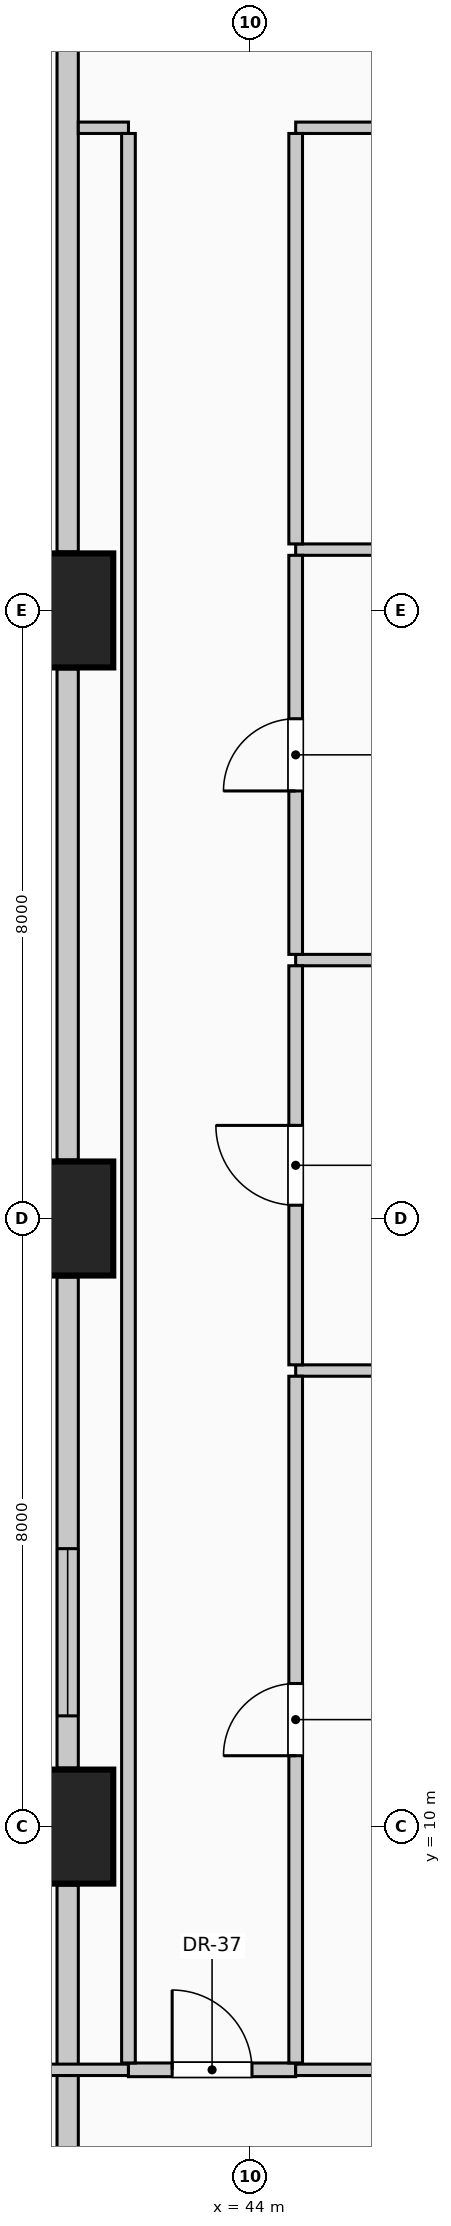
"""IFC4 building model, lengths in metres.
Left out: names, types, materials, properties, quantities, classifications, styles, units other than length and angle.
Written with IfcOpenShell. Run it as: python <this file> out.ifc"""

import sys

from ifc_helpers import new_model, si_unit, direction, frame, frame_2d, origin, origin_2d, place, context, subcontext, project, spatial, rectangle, extrude, element, fill, save


model = new_model("IFC4")
c1 = context("Model", 3, precision=1e-05, world=origin(), true_north=direction((0.0, 1.0)))
c2 = subcontext(c1, "Body", "Model", "MODEL_VIEW")
j1 = project(units=[si_unit("LENGTHUNIT", "METRE"), si_unit("PLANEANGLEUNIT", "RADIAN")], contexts=[c1])
p1 = place(None, origin())
s1 = spatial("IfcSite", under=j1, at=p1, CompositionType="ELEMENT")
p2 = place(p1, origin())
s2 = spatial("IfcBuilding", under=s1, at=p2, CompositionType="ELEMENT")
p3 = place(p2, frame((0.0, 0.0, 26.6)))
s3 = spatial("IfcBuildingStorey", under=s2, at=p3, CompositionType="ELEMENT", Elevation=26.6)
for number, where, z_axis, x_axis in (
    (1, (41.6, 10.0, 0.0), (0.0, 0.0, 1.0), (1.0, 0.0, 0.0)),
    (2, (41.6, 18.0, 0.0), (0.0, 0.0, 1.0), (1.0, 0.0, 0.0)),
    (3, (41.6, 26.0, 0.0), (0.0, 0.0, 1.0), (1.0, 0.0, 0.0)),
):
    element("IfcColumn", number, at=place(p3, frame(where, z_axis=z_axis, x_axis=x_axis)), inside=s3, PredefinedType="COLUMN", context=c2, shape_type="SweptSolid", body=[
        extrude(rectangle(XDim=1.2, YDim=1.5, at=origin_2d()), origin(), (0.0, 0.0, 1.0), 4.0),
    ])
p4 = place(p3, frame((41.6, 1.37, 0.0), z_axis=(0.0, 0.0, 1.0), x_axis=(0.0, 1.0, 0.0)))
e4 = element("IfcWall", 4, at=p4, inside=s3, PredefinedType="SOLIDWALL", context=c2, shape_type="SweptSolid", body=[
    extrude(rectangle(XDim=7.86, YDim=0.28, at=frame_2d((3.93, 0.0))), origin(), (0.0, 0.0, 1.0), 3.0),
])
p5 = place(p4, frame((1.153, 0.0, 0.42)))
e5 = element("IfcOpeningElement", 5, at=p5, cuts=e4, PredefinedType="OPENING", context=c2, shape_type="SweptSolid", body=[
    extrude(rectangle(XDim=2.2, YDim=1.95, at=frame_2d((1.1, 0.975))), frame((0.0, 0.15, 0.0), z_axis=(0.0, -1.0, 0.0), x_axis=(1.0, 0.0, 0.0)), (0.0, 0.0, 1.0), 0.3),
])
p6 = place(p3, frame((41.6, 10.77, 0.0), z_axis=(0.0, 0.0, 1.0), x_axis=(0.0, 1.0, 0.0)))
e6 = element("IfcWall", 6, at=p6, inside=s3, PredefinedType="SOLIDWALL", context=c2, shape_type="SweptSolid", body=[
    extrude(rectangle(XDim=6.46, YDim=0.28, at=frame_2d((3.23, 0.0))), origin(), (0.0, 0.0, 1.0), 3.0),
])
p7 = place(p6, frame((0.687, 0.0, 0.42)))
e7 = element("IfcOpeningElement", 7, at=p7, cuts=e6, PredefinedType="OPENING", context=c2, shape_type="SweptSolid", body=[
    extrude(rectangle(XDim=2.2, YDim=1.95, at=frame_2d((1.1, 0.975))), frame((0.0, 0.15, 0.0), z_axis=(0.0, -1.0, 0.0), x_axis=(1.0, 0.0, 0.0)), (0.0, 0.0, 1.0), 0.3),
])
p8 = place(p3, frame((41.6, 18.77, 0.0), z_axis=(0.0, 0.0, 1.0), x_axis=(0.0, 1.0, 0.0)))
e8 = element("IfcWall", 8, at=p8, inside=s3, PredefinedType="SOLIDWALL", context=c2, shape_type="SweptSolid", body=[
    extrude(rectangle(XDim=6.46, YDim=0.28, at=frame_2d((3.23, 0.0))), origin(), (0.0, 0.0, 1.0), 3.0),
])
p9 = place(p3, frame((41.6, 26.77, 0.0), z_axis=(0.0, 0.0, 1.0), x_axis=(0.0, 1.0, 0.0)))
e9 = element("IfcWall", 9, at=p9, inside=s3, PredefinedType="SOLIDWALL", context=c2, shape_type="SweptSolid", body=[
    extrude(rectangle(XDim=6.71, YDim=0.28, at=frame_2d((3.355, 0.0))), origin(), (0.0, 0.0, 1.0), 3.0),
])
p10 = place(p3, frame((41.12, 6.8, 0.0), z_axis=(0.0, 0.0, 1.0), x_axis=(1.0, 0.0, 0.0)))
e10 = element("IfcWall", 10, at=p10, inside=s3, PredefinedType="PARTITIONING", context=c2, shape_type="SweptSolid", body=[
    extrude(rectangle(XDim=1.28, YDim=0.15, at=frame_2d((0.64, 0.0))), origin(), (0.0, 0.0, 1.0), 3.095),
])
p11 = place(p3, frame((42.4, 6.8, 0.0), z_axis=(0.0, 0.0, 1.0), x_axis=(1.0, 0.0, 0.0)))
e11 = element("IfcWall", 11, at=p11, inside=s3, PredefinedType="PARTITIONING", context=c2, shape_type="SweptSolid", body=[
    extrude(rectangle(XDim=2.2, YDim=0.18, at=frame_2d((1.1, 0.0))), origin(), (0.0, 0.0, 1.0), 3.095),
])
p12 = place(p11, frame((0.575, 0.0, 0.0)))
e12 = element("IfcOpeningElement", 12, at=p12, cuts=e11, PredefinedType="OPENING", context=c2, shape_type="SweptSolid", body=[
    extrude(rectangle(XDim=1.05, YDim=2.15, at=frame_2d((0.525, 1.075))), frame((0.0, 0.1, 0.0), z_axis=(0.0, -1.0, 0.0), x_axis=(1.0, 0.0, 0.0)), (0.0, 0.0, 1.0), 0.2),
])
p13 = place(p3, frame((44.6, 6.8, 0.0), z_axis=(0.0, 0.0, 1.0), x_axis=(1.0, 0.0, 0.0)))
e13 = element("IfcWall", 13, at=p13, inside=s3, PredefinedType="PARTITIONING", context=c2, shape_type="SweptSolid", body=[
    extrude(rectangle(XDim=12.66, YDim=0.15, at=frame_2d((6.33, 0.0))), origin(), (0.0, 0.0, 1.0), 3.095),
])
for number, where, z_axis, x_axis in (
    (14, (44.6, 16.0, 0.0), (0.0, 0.0, 1.0), (1.0, 0.0, 0.0)),
    (15, (44.6, 21.4, 0.0), (0.0, 0.0, 1.0), (1.0, 0.0, 0.0)),
):
    element("IfcWall", number, at=place(p3, frame(where, z_axis=z_axis, x_axis=x_axis)), inside=s3, PredefinedType="PARTITIONING", context=c2, shape_type="SweptSolid", body=[
        extrude(rectangle(XDim=12.66, YDim=0.15, at=frame_2d((6.33, 0.0))), origin(), (0.0, 0.0, 1.0), 3.7),
    ])
p14 = place(p3, frame((44.6, 26.8, 0.0), z_axis=(0.0, 0.0, 1.0), x_axis=(1.0, 0.0, 0.0)))
e16 = element("IfcWall", 16, at=p14, inside=s3, PredefinedType="PARTITIONING", context=c2, shape_type="SweptSolid", body=[
    extrude(rectangle(XDim=7.7, YDim=0.15, at=frame_2d((3.85, 0.0))), origin(), (0.0, 0.0, 1.0), 3.7),
])
p15 = place(p3, frame((41.74, 32.35, 0.0), z_axis=(0.0, 0.0, 1.0), x_axis=(1.0, 0.0, 0.0)))
e17 = element("IfcWall", 17, at=p15, inside=s3, PredefinedType="PARTITIONING", context=c2, shape_type="SweptSolid", body=[
    extrude(rectangle(XDim=0.66, YDim=0.15, at=frame_2d((0.33, 0.0))), origin(), (0.0, 0.0, 1.0), 3.7),
])
p16 = place(p3, frame((44.6, 32.35, 0.0), z_axis=(0.0, 0.0, 1.0), x_axis=(1.0, 0.0, 0.0)))
e18 = element("IfcWall", 18, at=p16, inside=s3, PredefinedType="PARTITIONING", context=c2, shape_type="SweptSolid", body=[
    extrude(rectangle(XDim=7.7, YDim=0.15, at=frame_2d((3.85, 0.0))), origin(), (0.0, 0.0, 1.0), 3.7),
])
p17 = place(p16, frame((3.325, 0.0, 0.0)))
e19 = element("IfcOpeningElement", 19, at=p17, cuts=e18, PredefinedType="OPENING", context=c2, shape_type="SweptSolid", body=[
    extrude(rectangle(XDim=1.05, YDim=2.15, at=frame_2d((0.525, 1.075))), frame((0.0, 0.085, 0.0), z_axis=(0.0, -1.0, 0.0), x_axis=(1.0, 0.0, 0.0)), (0.0, 0.0, 1.0), 0.17),
])
p18 = place(p3, frame((42.4, 6.89, 0.0), z_axis=(0.0, 0.0, 1.0), x_axis=(0.0, 1.0, 0.0)))
e20 = element("IfcWall", 20, at=p18, inside=s3, PredefinedType="PARTITIONING", context=c2, shape_type="SweptSolid", body=[
    extrude(rectangle(XDim=25.385, YDim=0.18, at=frame_2d((12.692, 0.0))), origin(), (0.0, 0.0, 1.0), 3.7),
])
p19 = place(p3, frame((44.6, 6.89, 0.0), z_axis=(0.0, 0.0, 1.0), x_axis=(0.0, 1.0, 0.0)))
e21 = element("IfcWall", 21, at=p19, inside=s3, PredefinedType="PARTITIONING", context=c2, shape_type="SweptSolid", body=[
    extrude(rectangle(XDim=9.035, YDim=0.18, at=frame_2d((4.518, 0.0))), origin(), (0.0, 0.0, 1.0), 3.7),
])
p20 = place(p19, frame((4.042, 0.0, 0.0)))
e22 = element("IfcOpeningElement", 22, at=p20, cuts=e21, PredefinedType="OPENING", context=c2, shape_type="SweptSolid", body=[
    extrude(rectangle(XDim=0.95, YDim=2.15, at=frame_2d((0.475, 1.075))), frame((0.0, 0.1, 0.0), z_axis=(0.0, -1.0, 0.0), x_axis=(1.0, 0.0, 0.0)), (0.0, 0.0, 1.0), 0.2),
])
p21 = place(p3, frame((44.6, 16.075, 0.0), z_axis=(0.0, 0.0, 1.0), x_axis=(0.0, 1.0, 0.0)))
e23 = element("IfcWall", 23, at=p21, inside=s3, PredefinedType="PARTITIONING", context=c2, shape_type="SweptSolid", body=[
    extrude(rectangle(XDim=5.25, YDim=0.18, at=frame_2d((2.625, 0.0))), origin(), (0.0, 0.0, 1.0), 3.7),
])
p22 = place(p21, frame((2.1, 0.0, 0.0)))
e24 = element("IfcOpeningElement", 24, at=p22, cuts=e23, PredefinedType="OPENING", context=c2, shape_type="SweptSolid", body=[
    extrude(rectangle(XDim=1.05, YDim=2.15, at=frame_2d((0.525, 1.075))), frame((0.0, 0.1, 0.0), z_axis=(0.0, -1.0, 0.0), x_axis=(1.0, 0.0, 0.0)), (0.0, 0.0, 1.0), 0.2),
])
p23 = place(p3, frame((44.6, 21.475, 0.0), z_axis=(0.0, 0.0, 1.0), x_axis=(0.0, 1.0, 0.0)))
e25 = element("IfcWall", 25, at=p23, inside=s3, PredefinedType="PARTITIONING", context=c2, shape_type="SweptSolid", body=[
    extrude(rectangle(XDim=5.25, YDim=0.18, at=frame_2d((2.625, 0.0))), origin(), (0.0, 0.0, 1.0), 3.7),
])
p24 = place(p23, frame((2.15, 0.0, 0.0)))
e26 = element("IfcOpeningElement", 26, at=p24, cuts=e25, PredefinedType="OPENING", context=c2, shape_type="SweptSolid", body=[
    extrude(rectangle(XDim=0.95, YDim=2.15, at=frame_2d((0.475, 1.075))), frame((0.0, 0.1, 0.0), z_axis=(0.0, -1.0, 0.0), x_axis=(1.0, 0.0, 0.0)), (0.0, 0.0, 1.0), 0.2),
])
p25 = place(p3, frame((44.6, 26.875, 0.0), z_axis=(0.0, 0.0, 1.0), x_axis=(0.0, 1.0, 0.0)))
e27 = element("IfcWall", 27, at=p25, inside=s3, PredefinedType="PARTITIONING", context=c2, shape_type="SweptSolid", body=[
    extrude(rectangle(XDim=5.4, YDim=0.18, at=frame_2d((2.7, 0.0))), origin(), (0.0, 0.0, 1.0), 3.7),
])
p26 = place(p7, origin())
e28 = element("IfcWindow", 28, at=p26, inside=s3, PartitioningType="SINGLE_PANEL", PredefinedType="WINDOW", context=c2, shape_type="SweptSolid", body=[
    extrude(rectangle(XDim=2.2, YDim=1.95, at=frame_2d((1.1, 0.975))), frame((0.0, 0.03, 0.0), z_axis=(0.0, -1.0, 0.0), x_axis=(1.0, 0.0, 0.0)), (0.0, 0.0, 1.0), 0.06),
])
fill(e7, e28)
p27 = place(p12, origin())
e29 = element("IfcDoor", 29, at=p27, inside=s3, OperationType="SINGLE_SWING_LEFT", PredefinedType="DOOR", context=c2, shape_type="SweptSolid", body=[
    extrude(rectangle(XDim=1.05, YDim=2.15, at=frame_2d((0.525, 1.075))), frame((0.0, 0.025, 0.0), z_axis=(0.0, -1.0, 0.0), x_axis=(1.0, 0.0, 0.0)), (0.0, 0.0, 1.0), 0.05),
])
fill(e12, e29)
p28 = place(p20, origin())
e30 = element("IfcDoor", 30, at=p28, inside=s3, OperationType="SINGLE_SWING_LEFT", PredefinedType="DOOR", context=c2, shape_type="SweptSolid", body=[
    extrude(rectangle(XDim=0.95, YDim=2.15, at=frame_2d((0.475, 1.075))), frame((0.0, 0.025, 0.0), z_axis=(0.0, -1.0, 0.0), x_axis=(1.0, 0.0, 0.0)), (0.0, 0.0, 1.0), 0.05),
])
fill(e22, e30)
p29 = place(p22, origin())
e31 = element("IfcDoor", 31, at=p29, inside=s3, OperationType="SINGLE_SWING_RIGHT", PredefinedType="DOOR", context=c2, shape_type="SweptSolid", body=[
    extrude(rectangle(XDim=1.05, YDim=2.15, at=frame_2d((0.525, 1.075))), frame((0.0, 0.025, 0.0), z_axis=(0.0, -1.0, 0.0), x_axis=(1.0, 0.0, 0.0)), (0.0, 0.0, 1.0), 0.05),
])
fill(e24, e31)
p30 = place(p24, origin())
e32 = element("IfcDoor", 32, at=p30, inside=s3, OperationType="SINGLE_SWING_LEFT", PredefinedType="DOOR", context=c2, shape_type="SweptSolid", body=[
    extrude(rectangle(XDim=0.95, YDim=2.15, at=frame_2d((0.475, 1.075))), frame((0.0, 0.025, 0.0), z_axis=(0.0, -1.0, 0.0), x_axis=(1.0, 0.0, 0.0)), (0.0, 0.0, 1.0), 0.05),
])
fill(e26, e32)
save(model, sys.argv[1])
